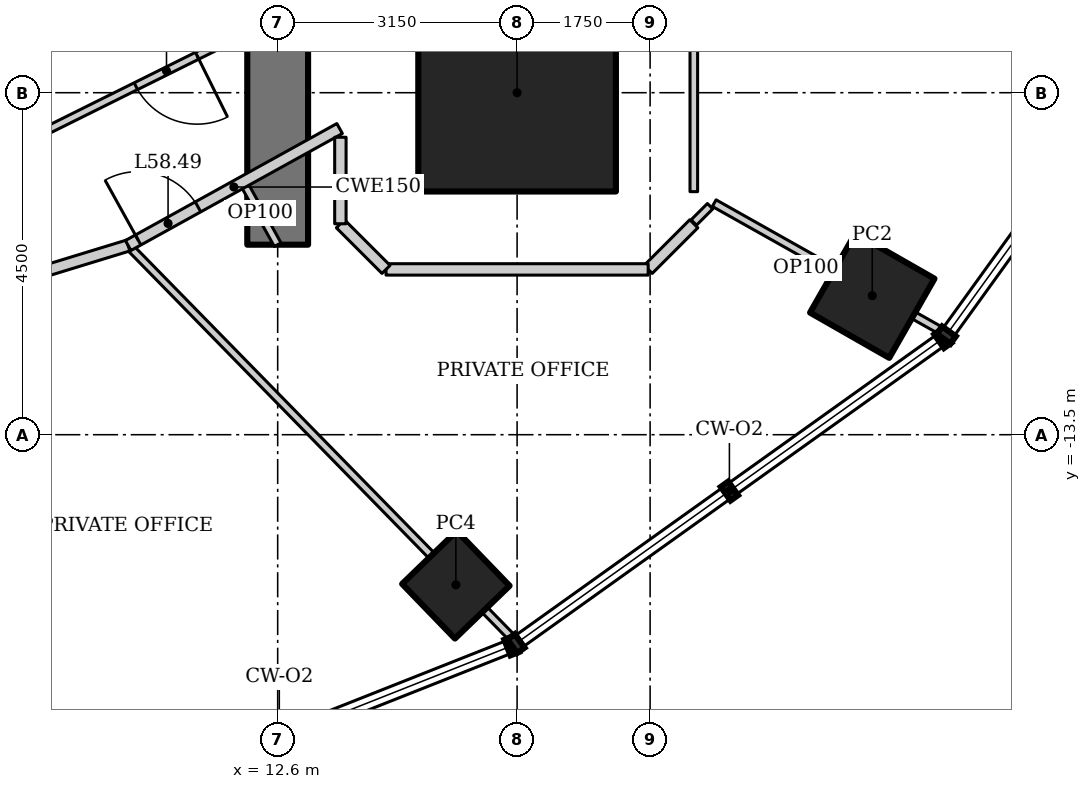
"""IFC4 building model, lengths in metres.
Left out: names, types, materials, properties, quantities, classifications, styles, units other than length and angle.
Written with IfcOpenShell. Run it as: python <this file> out.ifc"""

import sys

from ifc_helpers import new_model, si_unit, direction, frame, frame_2d, origin, origin_2d, place, context, subcontext, project, spatial, rectangle, hollow_rectangle, extrude, element, fill, save


model = new_model("IFC4")
c1 = context("Model", 3, precision=1e-05, world=origin(), true_north=direction((0.0, 1.0)))
c2 = subcontext(c1, "Body", "Model", "MODEL_VIEW")
j1 = project(units=[si_unit("LENGTHUNIT", "METRE"), si_unit("PLANEANGLEUNIT", "RADIAN")], contexts=[c1])
p1 = place(None, origin())
s1 = spatial("IfcSite", under=j1, at=p1, CompositionType="ELEMENT")
p2 = place(p1, origin())
s2 = spatial("IfcBuilding", under=s1, at=p2, CompositionType="ELEMENT")
p3 = place(p2, frame((0.0, 0.0, 249.4)))
s3 = spatial("IfcBuildingStorey", under=s2, at=p3, CompositionType="ELEMENT", Elevation=249.4)
p4 = place(p3, frame((15.75, -9.0, 0.0), z_axis=(0.0, 0.0, 1.0), x_axis=(1.0, 0.0, 0.0)))
e1 = element("IfcColumn", 1, at=p4, inside=s3, PredefinedType="COLUMN", context=c2, shape_type="SweptSolid", body=[
    extrude(hollow_rectangle(XDim=2.6, YDim=2.6, WallThickness=0.13, at=origin_2d()), origin(), (0.0, 0.0, 1.0), 4.2),
])
for number, where, z_axis, x_axis in (
    (2, (9.035, -17.731, 0.0), (0.0, 0.0, 1.0), (0.891, 0.454, 0.0)),
    (3, (14.944, -15.475, 0.0), (0.0, 0.0, 1.0), (0.719, 0.695, 0.0)),
):
    element("IfcColumn", number, at=place(p3, frame(where, z_axis=z_axis, x_axis=x_axis)), inside=s3, PredefinedType="COLUMN", context=c2, shape_type="SweptSolid", body=[
        extrude(hollow_rectangle(XDim=1.0, YDim=1.0, WallThickness=0.08, at=origin_2d()), origin(), (0.0, 0.0, 1.0), 4.2),
    ])
p5 = place(p3, frame((20.423, -11.67, 0.0), z_axis=(0.0, 0.0, 1.0), x_axis=(0.496139221777, 0.86824298017, 0.0)))
e4 = element("IfcColumn", 4, at=p5, inside=s3, PredefinedType="COLUMN", context=c2, shape_type="SweptSolid", body=[
    extrude(hollow_rectangle(XDim=1.2, YDim=1.2, WallThickness=0.1, at=origin_2d()), origin(), (0.0, 0.0, 1.0), 4.2),
])
p6 = place(p3, frame((12.6, -11.0, 0.0), z_axis=(0.0, 0.0, 1.0), x_axis=(0.0, 1.0, 0.0)))
e5 = element("IfcWall", 5, at=p6, inside=s3, PredefinedType="SHEAR", context=c2, shape_type="SweptSolid", body=[
    extrude(rectangle(XDim=22.0, YDim=0.8, at=frame_2d((11.0, 0.0))), origin(), (0.0, 0.0, 1.0), 4.2),
])
p7 = place(p6, frame((10.1, 0.0, 0.0)))
e6 = element("IfcOpeningElement", 6, at=p7, cuts=e5, PredefinedType="OPENING", context=c2, shape_type="SweptSolid", body=[
    extrude(rectangle(XDim=1.8, YDim=2.1, at=frame_2d((0.9, 1.05))), frame((0.0, 0.41, 0.0), z_axis=(0.0, -1.0, 0.0), x_axis=(1.0, 0.0, 0.0)), (0.0, 0.0, 1.0), 0.82),
])
p8 = place(p3, frame((15.709, -16.199, 0.0), z_axis=(0.0, 0.0, 1.0), x_axis=(-0.699362525935, 0.714767135029, 0.0)))
e7 = element("IfcWall", 7, at=p8, inside=s3, PredefinedType="PARTITIONING", context=c2, shape_type="SweptSolid", body=[
    extrude(rectangle(XDim=7.259, YDim=0.1, at=frame_2d((3.629, 0.0))), origin(), (0.0, 0.0, 1.0), 3.41),
])
p9 = place(p3, frame((6.288, -12.341, 0.0), z_axis=(0.0, 0.0, 1.0), x_axis=(0.956185837153, 0.292760388079, 0.0)))
e8 = element("IfcWall", 8, at=p9, inside=s3, PredefinedType="PARTITIONING", context=c2, shape_type="SweptSolid", body=[
    extrude(rectangle(XDim=4.544, YDim=0.15, at=frame_2d((2.272, 0.0))), origin(), (0.0, 0.0, 1.0), 4.05),
])
p10 = place(p9, frame((2.031, 0.0, 0.0)))
e9 = element("IfcOpeningElement", 9, at=p10, cuts=e8, PredefinedType="OPENING", context=c2, shape_type="SweptSolid", body=[
    extrude(rectangle(XDim=0.9, YDim=2.1, at=frame_2d((0.45, 1.05))), frame((0.0, 0.085, 0.0), z_axis=(0.0, -1.0, 0.0), x_axis=(1.0, 0.0, 0.0)), (0.0, 0.0, 1.0), 0.17),
])
p11 = place(p3, frame((12.977, -7.8, 0.0), z_axis=(0.0, 0.0, 1.0), x_axis=(-0.895529831139, -0.445001484874, 0.0)))
e10 = element("IfcWall", 10, at=p11, inside=s3, PredefinedType="PARTITIONING", context=c2, shape_type="SweptSolid", body=[
    extrude(rectangle(XDim=4.108, YDim=0.1, at=frame_2d((2.054, 0.0))), origin(), (0.0, 0.0, 1.0), 4.05),
])
p12 = place(p11, frame((1.604, 0.0, 0.0)))
e11 = element("IfcOpeningElement", 11, at=p12, cuts=e10, PredefinedType="OPENING", context=c2, shape_type="SweptSolid", body=[
    extrude(rectangle(XDim=0.9, YDim=2.1, at=frame_2d((0.45, 1.05))), frame((0.0, 0.06, 0.0), z_axis=(0.0, -1.0, 0.0), x_axis=(1.0, 0.0, 0.0)), (0.0, 0.0, 1.0), 0.12),
])
p13 = place(p3, frame((12.6, -11.0, 0.0), z_axis=(0.0, 0.0, 1.0), x_axis=(-0.484103558985, 0.875010710893, 0.0)))
e12 = element("IfcWall", 12, at=p13, inside=s3, PredefinedType="PARTITIONING", context=c2, shape_type="SweptSolid", body=[
    extrude(rectangle(XDim=0.943, YDim=0.1, at=frame_2d((0.472, 0.0))), origin(), (0.0, 0.0, 1.0), 4.05),
])
p14 = place(p3, frame((21.358, -12.15, 0.0), z_axis=(0.0, 0.0, 1.0), x_axis=(-0.871494482514, 0.49040530885, 0.0)))
e13 = element("IfcWall", 13, at=p14, inside=s3, PredefinedType="PARTITIONING", context=c2, shape_type="SweptSolid", body=[
    extrude(rectangle(XDim=3.459, YDim=0.1, at=frame_2d((1.73, 0.0))), origin(), (0.0, 0.0, 1.0), 3.522),
])
p15 = place(p3, frame((10.633, -11.01, 0.0), z_axis=(0.0, 0.0, 1.0), x_axis=(0.875072100837, 0.483992580869, 0.0)))
e14 = element("IfcWall", 14, at=p15, inside=s3, PredefinedType="PARTITIONING", context=c2, shape_type="SweptSolid", body=[
    extrude(rectangle(XDim=3.179, YDim=0.15, at=frame_2d((1.59, 0.0))), origin(), (0.0, 0.0, 1.0), 4.05),
])
p16 = place(p15, frame((0.15, 0.0, 0.0)))
e15 = element("IfcOpeningElement", 15, at=p16, cuts=e14, PredefinedType="OPENING", context=c2, shape_type="SweptSolid", body=[
    extrude(rectangle(XDim=0.9, YDim=2.1, at=frame_2d((0.45, 1.05))), frame((0.0, 0.085, 0.0), z_axis=(0.0, -1.0, 0.0), x_axis=(1.0, 0.0, 0.0)), (0.0, 0.0, 1.0), 0.17),
])
p17 = place(p3, frame((18.075, -10.725, 0.0), z_axis=(0.0, 0.0, 1.0), x_axis=(-0.707106781187, -0.707106781187, 0.0)))
e16 = element("IfcWall", 16, at=p17, inside=s3, PredefinedType="PARTITIONING", context=c2, shape_type="SweptSolid", body=[
    extrude(rectangle(XDim=0.849, YDim=0.15, at=frame_2d((0.425, 0.0))), origin(), (0.0, 0.0, 1.0), 4.05),
])
p18 = place(p3, frame((17.475, -11.325, 0.0), z_axis=(0.0, 0.0, 1.0), x_axis=(-1.0, 0.0, 0.0)))
e17 = element("IfcWall", 17, at=p18, inside=s3, PredefinedType="PARTITIONING", context=c2, shape_type="SweptSolid", body=[
    extrude(rectangle(XDim=3.449, YDim=0.15, at=frame_2d((1.725, 0.0))), origin(), (0.0, 0.0, 1.0), 4.05),
])
p19 = place(p3, frame((14.025, -11.325, 0.0), z_axis=(0.0, 0.0, 1.0), x_axis=(-0.707106781187, 0.707106781187, 0.0)))
e18 = element("IfcWall", 18, at=p19, inside=s3, PredefinedType="PARTITIONING", context=c2, shape_type="SweptSolid", body=[
    extrude(rectangle(XDim=0.849, YDim=0.15, at=frame_2d((0.425, 0.0))), origin(), (0.0, 0.0, 1.0), 4.05),
])
p20 = place(p3, frame((13.425, -10.725, 0.0), z_axis=(0.0, 0.0, 1.0), x_axis=(0.0, 1.0, 0.0)))
e19 = element("IfcWall", 19, at=p20, inside=s3, PredefinedType="PARTITIONING", context=c2, shape_type="SweptSolid", body=[
    extrude(rectangle(XDim=1.138, YDim=0.15, at=frame_2d((0.569, 0.0))), origin(), (0.0, 0.0, 1.0), 4.05),
])
p21 = place(p3, frame((18.289, -10.493, 0.0), z_axis=(0.0, 0.0, 1.0), x_axis=(-0.707509576179, -0.706703756616, 0.0)))
e20 = element("IfcWall", 20, at=p21, inside=s3, PredefinedType="PARTITIONING", context=c2, shape_type="SweptSolid", body=[
    extrude(rectangle(XDim=0.303, YDim=0.1, at=frame_2d((0.151, 0.0))), origin(), (0.0, 0.0, 1.0), 4.05),
])
p22 = place(p3, frame((18.075, -7.275, 0.0), z_axis=(0.0, 0.0, 1.0), x_axis=(0.0, -1.0, 0.0)))
e21 = element("IfcWall", 21, at=p22, inside=s3, PredefinedType="PARTITIONING", context=c2, shape_type="SweptSolid", body=[
    extrude(rectangle(XDim=3.027, YDim=0.1, at=frame_2d((1.513, 0.0))), origin(), (0.0, 0.0, 1.0), 3.601),
])
p23 = place(p12, origin())
e22 = element("IfcDoor", 22, at=p23, inside=s3, OperationType="SINGLE_SWING_LEFT", PredefinedType="DOOR", context=c2, shape_type="SweptSolid", body=[
    extrude(rectangle(XDim=0.9, YDim=2.1, at=frame_2d((0.45, 1.05))), frame((0.0, 0.025, 0.0), z_axis=(0.0, -1.0, 0.0), x_axis=(1.0, 0.0, 0.0)), (0.0, 0.0, 1.0), 0.05),
])
fill(e11, e22)
p24 = place(p16, origin())
e23 = element("IfcDoor", 23, at=p24, inside=s3, OperationType="SINGLE_SWING_LEFT", PredefinedType="DOOR", context=c2, shape_type="SweptSolid", body=[
    extrude(rectangle(XDim=0.9, YDim=2.1, at=frame_2d((0.45, 1.05))), frame((0.0, 0.025, 0.0), z_axis=(0.0, -1.0, 0.0), x_axis=(1.0, 0.0, 0.0)), (0.0, 0.0, 1.0), 0.05),
])
fill(e15, e23)
save(model, sys.argv[1])
